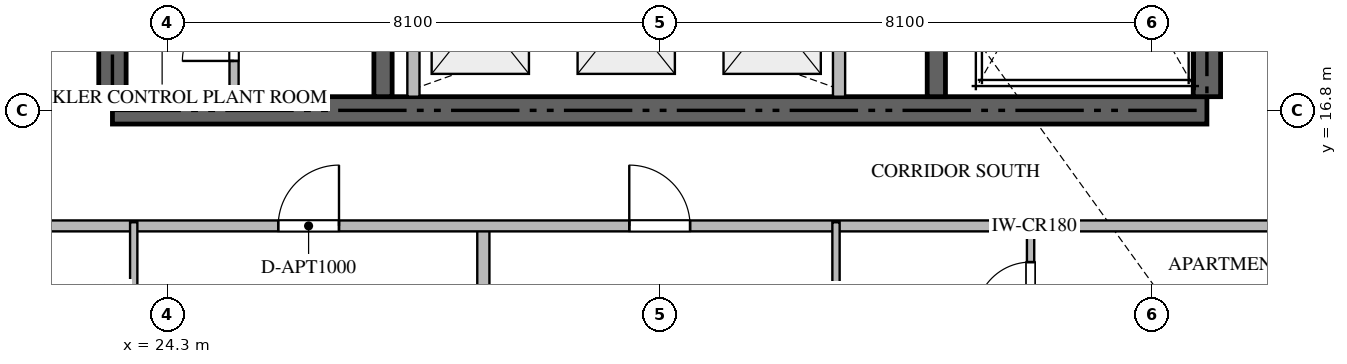
"""IFC4 building model, lengths in metres.
Left out: names, types, materials, properties, quantities, classifications, styles, units other than length and angle.
Written with IfcOpenShell. Run it as: python <this file> out.ifc"""

import sys

from ifc_helpers import new_model, si_unit, direction, frame, frame_2d, origin, place, context, subcontext, project, spatial, rectangle, extrude, source, transform, mapped, element, fill, save


model = new_model("IFC4")
c1 = context("Model", 3, precision=1e-05, world=origin(), true_north=direction((0.0, 1.0)))
c2 = subcontext(c1, "Body", "Model", "MODEL_VIEW")
j1 = project(units=[si_unit("LENGTHUNIT", "METRE"), si_unit("PLANEANGLEUNIT", "RADIAN")], contexts=[c1])
p1 = place(None, origin())
s1 = spatial("IfcSite", under=j1, at=p1, CompositionType="ELEMENT")
p2 = place(p1, origin())
s2 = spatial("IfcBuilding", under=s1, at=p2, CompositionType="ELEMENT")
p3 = place(p2, frame((0.0, 0.0, 79.2)))
s3 = spatial("IfcBuildingStorey", under=s2, at=p3, CompositionType="ELEMENT", Elevation=79.2)
p4 = place(p3, frame((23.4, 16.8, -0.26), z_axis=(0.0, 0.0, 1.0), x_axis=(1.0, 0.0, 0.0)))
e1 = element("IfcWall", 1, at=p4, inside=s3, PredefinedType="SHEAR", context=c2, shape_type="SweptSolid", body=[
    extrude(rectangle(XDim=18.0, YDim=0.45, at=frame_2d((9.0, 0.0))), origin(), (0.0, 0.0, 1.0), 3.748),
])
p5 = place(p3, frame((23.4, 17.025, -0.26), z_axis=(0.0, 0.0, 1.0), x_axis=(0.0, 1.0, 0.0)))
e2 = element("IfcWall", 2, at=p5, inside=s3, PredefinedType="SHEAR", context=c2, shape_type="SweptSolid", body=[
    extrude(rectangle(XDim=4.825, YDim=0.45, at=frame_2d((2.413, 0.0))), origin(), (0.0, 0.0, 1.0), 3.748),
])
p6 = place(p3, frame((41.4, 17.025, -0.26), z_axis=(0.0, 0.0, 1.0), x_axis=(0.0, 1.0, 0.0)))
e3 = element("IfcWall", 3, at=p6, inside=s3, PredefinedType="SHEAR", context=c2, shape_type="SweptSolid", body=[
    extrude(rectangle(XDim=8.325, YDim=0.45, at=frame_2d((4.163, 0.0))), origin(), (0.0, 0.0, 1.0), 3.748),
])
p7 = place(p3, frame((27.85, 17.025, -0.26), z_axis=(0.0, 0.0, 1.0), x_axis=(0.0, 1.0, 0.0)))
e4 = element("IfcWall", 4, at=p7, inside=s3, PredefinedType="SHEAR", context=c2, shape_type="SweptSolid", body=[
    extrude(rectangle(XDim=4.825, YDim=0.3, at=frame_2d((2.413, 0.0))), origin(), (0.0, 0.0, 1.0), 3.748),
])
p8 = place(p3, frame((36.95, 17.025, -0.26), z_axis=(0.0, 0.0, 1.0), x_axis=(0.0, 1.0, 0.0)))
e5 = element("IfcWall", 5, at=p8, inside=s3, PredefinedType="SHEAR", context=c2, shape_type="SweptSolid", body=[
    extrude(rectangle(XDim=8.325, YDim=0.3, at=frame_2d((4.163, 0.0))), origin(), (0.0, 0.0, 1.0), 3.748),
])
for number, where, z_axis, x_axis in (
    (6, (28.35, 17.025, 0.0), (0.0, 0.0, 1.0), (0.0, 1.0, 0.0)),
    (7, (35.35, 17.025, 0.0), (0.0, 0.0, 1.0), (0.0, 1.0, 0.0)),
):
    element("IfcWall", number, at=place(p3, frame(where, z_axis=z_axis, x_axis=x_axis)), inside=s3, PredefinedType="STANDARD", context=c2, shape_type="SweptSolid", body=[
        extrude(rectangle(XDim=2.525, YDim=0.2, at=frame_2d((1.263, 0.0))), origin(), (0.0, 0.0, 1.0), 3.49),
    ])
p9 = place(p3, frame((25.4, 17.025, 0.0), z_axis=(0.0, 0.0, 1.0), x_axis=(0.0, 1.0, 0.0)))
e8 = element("IfcWall", 8, at=p9, inside=s3, PredefinedType="PARTITIONING", context=c2, shape_type="SweptSolid", body=[
    extrude(rectangle(XDim=2.025, YDim=0.15, at=frame_2d((1.013, 0.0))), origin(), (0.0, 0.0, 1.0), 3.49),
])
p10 = place(p9, frame((0.588, 0.0, 0.0)))
e9 = element("IfcOpeningElement", 9, at=p10, cuts=e8, PredefinedType="OPENING", context=c2, shape_type="SweptSolid", body=[
    extrude(rectangle(XDim=0.85, YDim=2.1, at=frame_2d((0.425, 1.05))), frame((0.0, 0.085, 0.0), z_axis=(0.0, -1.0, 0.0), x_axis=(1.0, 0.0, 0.0)), (0.0, 0.0, 1.0), 0.17),
])
p11 = place(p3, frame((29.5, 0.282, 0.0), z_axis=(0.0, 0.0, 1.0), x_axis=(0.0, 1.0, 0.0)))
e10 = element("IfcWall", 10, at=p11, inside=s3, PredefinedType="PARTITIONING", context=c2, shape_type="SweptSolid", body=[
    extrude(rectangle(XDim=14.618, YDim=0.2, at=frame_2d((7.309, 0.0))), origin(), (0.0, 0.0, 1.0), 3.49),
])
p12 = place(p3, frame((21.402, 14.9, 0.0), z_axis=(0.0, 0.0, 1.0), x_axis=(1.0, 0.0, 0.0)))
e11 = element("IfcWall", 11, at=p12, inside=s3, PredefinedType="PARTITIONING", context=c2, shape_type="SweptSolid", body=[
    extrude(rectangle(XDim=21.996, YDim=0.18, at=frame_2d((10.998, 0.0))), origin(), (0.0, 0.0, 1.0), 3.49),
])
p13 = place(p12, frame((4.724, 0.0, 0.0)))
e12 = element("IfcOpeningElement", 12, at=p13, cuts=e11, PredefinedType="OPENING", context=c2, shape_type="SweptSolid", body=[
    extrude(rectangle(XDim=1.0, YDim=2.15, at=frame_2d((0.5, 1.075))), frame((0.0, 0.1, 0.0), z_axis=(0.0, -1.0, 0.0), x_axis=(1.0, 0.0, 0.0)), (0.0, 0.0, 1.0), 0.2),
])
p14 = place(p12, frame((10.498, 0.0, 0.0)))
e13 = element("IfcOpeningElement", 13, at=p14, cuts=e11, PredefinedType="OPENING", context=c2, shape_type="SweptSolid", body=[
    extrude(rectangle(XDim=1.0, YDim=2.15, at=frame_2d((0.5, 1.075))), frame((0.0, 0.1, 0.0), z_axis=(0.0, -1.0, 0.0), x_axis=(1.0, 0.0, 0.0)), (0.0, 0.0, 1.0), 0.2),
])
for number, where, z_axis, x_axis in (
    (14, (23.75, 12.15, 0.0), (0.0, 0.0, 1.0), (0.0, 1.0, 0.0)),
    (15, (35.3, 12.15, 0.0), (0.0, 0.0, 1.0), (0.0, 1.0, 0.0)),
):
    element("IfcWall", number, at=place(p3, frame(where, z_axis=z_axis, x_axis=x_axis)), inside=s3, PredefinedType="PARTITIONING", context=c2, shape_type="SweptSolid", body=[
        extrude(rectangle(XDim=2.81, YDim=0.12, at=frame_2d((1.405, 0.0))), origin(), (0.0, 0.0, 1.0), 3.49),
    ])
p15 = place(p3, frame((38.5, 12.75, 0.0), z_axis=(0.0, 0.0, 1.0), x_axis=(0.0, 1.0, 0.0)))
e16 = element("IfcWall", 16, at=p15, inside=s3, PredefinedType="PARTITIONING", context=c2, shape_type="SweptSolid", body=[
    extrude(rectangle(XDim=2.21, YDim=0.12, at=frame_2d((1.105, 0.0))), origin(), (0.0, 0.0, 1.0), 3.49),
])
p16 = place(p15, frame((0.655, 0.0, 0.0)))
e17 = element("IfcOpeningElement", 17, at=p16, cuts=e16, PredefinedType="OPENING", context=c2, shape_type="SweptSolid", body=[
    extrude(rectangle(XDim=0.9, YDim=2.1, at=frame_2d((0.45, 1.05))), frame((0.0, 0.07, 0.0), z_axis=(0.0, -1.0, 0.0), x_axis=(1.0, 0.0, 0.0)), (0.0, 0.0, 1.0), 0.14),
])
m1 = source(origin(), c2, "Body", "SweptSolid", [
    extrude(rectangle(XDim=0.85, YDim=2.1, at=frame_2d((0.425, 1.05))), frame((0.0, 0.025, 0.0), z_axis=(0.0, -1.0, 0.0), x_axis=(1.0, 0.0, 0.0)), (0.0, 0.0, 1.0), 0.05),
])
p17 = place(p10, origin())
e18 = element("IfcDoor", 18, at=p17, inside=s3, OperationType="SINGLE_SWING_LEFT", PredefinedType="DOOR", context=c2, shape_type="MappedRepresentation", body=[
    mapped(m1, transform((0.0, 0.0, 0.0), scale=1.0)),
])
fill(e9, e18)
m2 = source(origin(), c2, "Body", "SweptSolid", [
    extrude(rectangle(XDim=1.0, YDim=2.15, at=frame_2d((0.5, 1.075))), frame((0.0, 0.025, 0.0), z_axis=(0.0, -1.0, 0.0), x_axis=(1.0, 0.0, 0.0)), (0.0, 0.0, 1.0), 0.05),
])
p18 = place(p13, origin())
e19 = element("IfcDoor", 19, at=p18, inside=s3, OperationType="SINGLE_SWING_RIGHT", PredefinedType="DOOR", context=c2, shape_type="MappedRepresentation", body=[
    mapped(m2, transform((0.0, 0.0, 0.0), scale=1.0)),
])
fill(e12, e19)
p19 = place(p14, origin())
e20 = element("IfcDoor", 20, at=p19, inside=s3, OperationType="SINGLE_SWING_LEFT", PredefinedType="DOOR", context=c2, shape_type="MappedRepresentation", body=[
    mapped(m2, transform((0.0, 0.0, 0.0), scale=1.0)),
])
fill(e13, e20)
m3 = source(origin(), c2, "Body", "SweptSolid", [
    extrude(rectangle(XDim=0.9, YDim=2.1, at=frame_2d((0.45, 1.05))), frame((0.0, 0.025, 0.0), z_axis=(0.0, -1.0, 0.0), x_axis=(1.0, 0.0, 0.0)), (0.0, 0.0, 1.0), 0.05),
])
p20 = place(p16, origin())
e21 = element("IfcDoor", 21, at=p20, inside=s3, OperationType="SINGLE_SWING_LEFT", PredefinedType="DOOR", context=c2, shape_type="MappedRepresentation", body=[
    mapped(m3, transform((0.0, 0.0, 0.0), scale=1.0)),
])
fill(e17, e21)
save(model, sys.argv[1])
